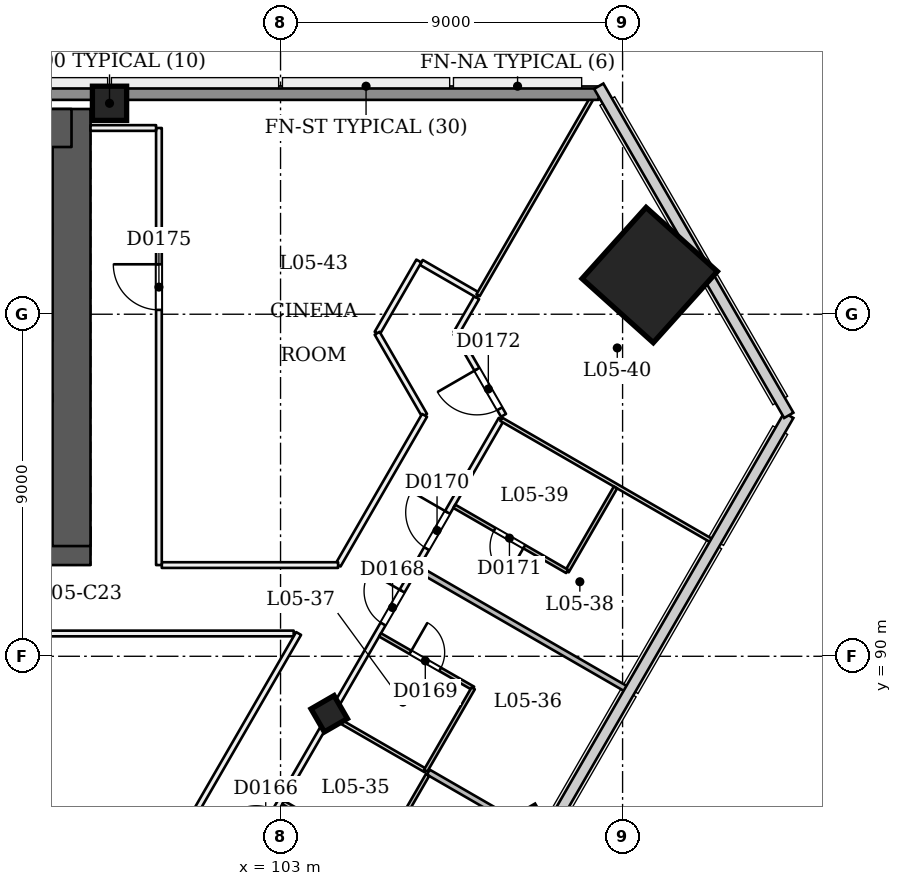
"""IFC4 building model, lengths in metres.
Left out: names, types, materials, properties, quantities, classifications, styles, units other than length and angle.
Written with IfcOpenShell. Run it as: python <this file> out.ifc"""

import sys

from ifc_helpers import new_model, si_unit, direction, frame, frame_2d, origin, origin_2d, place, context, subcontext, project, spatial, rectangle, extrude, element, fill, save


model = new_model("IFC4")
c1 = context("Model", 3, precision=1e-05, world=origin(), true_north=direction((0.0, 1.0)))
c2 = subcontext(c1, "Body", "Model", "MODEL_VIEW")
j1 = project(units=[si_unit("LENGTHUNIT", "METRE"), si_unit("PLANEANGLEUNIT", "RADIAN")], contexts=[c1])
p1 = place(None, origin())
s1 = spatial("IfcSite", under=j1, at=p1, CompositionType="ELEMENT")
p2 = place(p1, origin())
s2 = spatial("IfcBuilding", under=s1, at=p2, CompositionType="ELEMENT")
p3 = place(p2, frame((0.0, 0.0, 27.0)))
s3 = spatial("IfcBuildingStorey", under=s2, at=p3, CompositionType="ELEMENT", Elevation=27.0)
p4 = place(p3, frame((72.5, 92.9, 0.0), z_axis=(0.0, 0.0, 1.0), x_axis=(1.0, 0.0, 0.0)))
e1 = element("IfcWall", 1, at=p4, inside=s3, PredefinedType="SHEAR", context=c2, shape_type="SweptSolid", body=[
    extrude(rectangle(XDim=25.5, YDim=1.0, at=frame_2d((12.75, 0.0))), origin(), (0.0, 0.0, 1.0), 3.6),
])
p5 = place(p4, frame((1.3, 0.0, 0.0)))
e2 = element("IfcOpeningElement", 2, at=p5, cuts=e1, PredefinedType="OPENING", context=c2, shape_type="SweptSolid", body=[
    extrude(rectangle(XDim=1.2, YDim=2.1, at=frame_2d((0.6, 1.05))), frame((0.0, 0.51, 0.0), z_axis=(0.0, -1.0, 0.0), x_axis=(1.0, 0.0, 0.0)), (0.0, 0.0, 1.0), 1.021),
])
p6 = place(p4, frame((3.5, 0.0, 0.0)))
e3 = element("IfcOpeningElement", 3, at=p6, cuts=e1, PredefinedType="OPENING", context=c2, shape_type="SweptSolid", body=[
    extrude(rectangle(XDim=1.2, YDim=2.1, at=frame_2d((0.6, 1.05))), frame((0.0, 0.51, 0.0), z_axis=(0.0, -1.0, 0.0), x_axis=(1.0, 0.0, 0.0)), (0.0, 0.0, 1.0), 1.021),
])
p7 = place(p4, frame((13.5, 0.0, 0.0)))
e4 = element("IfcOpeningElement", 4, at=p7, cuts=e1, PredefinedType="OPENING", context=c2, shape_type="SweptSolid", body=[
    extrude(rectangle(XDim=1.2, YDim=2.1, at=frame_2d((0.6, 1.05))), frame((0.0, 0.51, 0.0), z_axis=(0.0, -1.0, 0.0), x_axis=(1.0, 0.0, 0.0)), (0.0, 0.0, 1.0), 1.021),
])
p8 = place(p4, frame((15.562, 0.0, 0.0)))
e5 = element("IfcOpeningElement", 5, at=p8, cuts=e1, PredefinedType="OPENING", context=c2, shape_type="SweptSolid", body=[
    extrude(rectangle(XDim=1.0, YDim=2.1, at=frame_2d((0.5, 1.05))), frame((0.0, 0.51, 0.0), z_axis=(0.0, -1.0, 0.0), x_axis=(1.0, 0.0, 0.0)), (0.0, 0.0, 1.0), 1.021),
])
p9 = place(p4, frame((17.8, 0.0, 0.0)))
e6 = element("IfcOpeningElement", 6, at=p9, cuts=e1, PredefinedType="OPENING", context=c2, shape_type="SweptSolid", body=[
    extrude(rectangle(XDim=1.0, YDim=2.1, at=frame_2d((0.5, 1.05))), frame((0.0, 0.51, 0.0), z_axis=(0.0, -1.0, 0.0), x_axis=(1.0, 0.0, 0.0)), (0.0, 0.0, 1.0), 1.021),
])
p10 = place(p4, frame((20.35, 0.0, 0.0)))
e7 = element("IfcOpeningElement", 7, at=p10, cuts=e1, PredefinedType="OPENING", context=c2, shape_type="SweptSolid", body=[
    extrude(rectangle(XDim=1.0, YDim=2.1, at=frame_2d((0.5, 1.05))), frame((0.0, 0.51, 0.0), z_axis=(0.0, -1.0, 0.0), x_axis=(1.0, 0.0, 0.0)), (0.0, 0.0, 1.0), 1.021),
])
p11 = place(p4, frame((22.837, 0.0, 0.0)))
e8 = element("IfcOpeningElement", 8, at=p11, cuts=e1, PredefinedType="OPENING", context=c2, shape_type="SweptSolid", body=[
    extrude(rectangle(XDim=1.0, YDim=2.1, at=frame_2d((0.5, 1.05))), frame((0.0, 0.51, 0.0), z_axis=(0.0, -1.0, 0.0), x_axis=(1.0, 0.0, 0.0)), (0.0, 0.0, 1.0), 1.021),
])
p12 = place(p3, frame((97.5, 92.9, 0.0), z_axis=(0.0, 0.0, 1.0), x_axis=(0.0, 1.0, 0.0)))
e9 = element("IfcWall", 9, at=p12, inside=s3, PredefinedType="SHEAR", context=c2, shape_type="SweptSolid", body=[
    extrude(rectangle(XDim=11.5, YDim=1.0, at=frame_2d((5.75, 0.0))), origin(), (0.0, 0.0, 1.0), 3.6),
])
p13 = place(p3, frame((97.5, 103.9, 0.0), z_axis=(0.0, 0.0, 1.0), x_axis=(-1.0, 0.0, 0.0)))
e10 = element("IfcWall", 10, at=p13, inside=s3, PredefinedType="SHEAR", context=c2, shape_type="SweptSolid", body=[
    extrude(rectangle(XDim=25.5, YDim=1.0, at=frame_2d((12.75, 0.0))), origin(), (0.0, 0.0, 1.0), 3.6),
])
p14 = place(p3, frame((104.308, 88.44, -0.021), z_axis=(-0.02222134892, 0.038480872521, 0.999012229206), x_axis=(-0.500169939593, -0.865642180581, 0.022218162104)))
e11 = element("IfcColumn", 11, at=p14, inside=s3, PredefinedType="COLUMN", context=c2, shape_type="SweptSolid", body=[
    extrude(rectangle(XDim=0.7, YDim=0.7, at=origin_2d()), origin(), (0.0, 0.0, 1.0), 3.604),
])
p15 = place(p3, frame((112.747, 100.02, 0.0), z_axis=(-0.028401796786, 0.009286506348, 0.999553449666), x_axis=(0.498883843993, -0.866383845889, 0.022224801134)))
e12 = element("IfcColumn", 12, at=p15, inside=s3, PredefinedType="COLUMN", context=c2, shape_type="SweptSolid", body=[
    extrude(rectangle(XDim=2.52, YDim=2.52, at=origin_2d()), origin(), (0.0, 0.0, 1.0), 3.602),
])
p16 = place(p3, frame((98.5, 104.55, 0.0), z_axis=(0.0, 0.0, 1.0), x_axis=(1.0, 0.0, 0.0)))
e13 = element("IfcColumn", 13, at=p16, inside=s3, PredefinedType="COLUMN", context=c2, shape_type="SweptSolid", body=[
    extrude(rectangle(XDim=0.9, YDim=0.9, at=origin_2d()), origin(), (0.0, 0.0, 1.0), 3.6),
])
p17 = place(p3, frame((109.547, 85.415, -0.027), z_axis=(-0.022153634206, 0.038480930364, 0.999013730882), x_axis=(-0.50131289949, -0.864981202213, 0.022201275242)))
e14 = element("IfcColumn", 14, at=p17, inside=s3, PredefinedType="COLUMN", context=c2, shape_type="SweptSolid", body=[
    extrude(rectangle(XDim=0.9, YDim=0.9, at=origin_2d()), origin(), (0.0, 0.0, 1.0), 3.604),
])
p18 = place(p3, frame((86.307, 57.264, 0.0), z_axis=(0.0, 0.0, 1.0), x_axis=(0.500000579958, 0.866025068945, 0.0)))
e15 = element("IfcWall", 15, at=p18, inside=s3, PredefinedType="PARTITIONING", context=c2, shape_type="SweptSolid", body=[
    extrude(rectangle(XDim=40.5, YDim=0.15, at=frame_2d((20.25, 0.0))), origin(), (0.0, 0.0, 1.0), 2.7),
])
p19 = place(p18, frame((0.72, 0.0, 0.0)))
e16 = element("IfcOpeningElement", 16, at=p19, cuts=e15, PredefinedType="OPENING", context=c2, shape_type="SweptSolid", body=[
    extrude(rectangle(XDim=1.0, YDim=2.1, at=frame_2d((0.5, 1.05))), frame((0.0, 0.085, 0.0), z_axis=(0.0, -1.0, 0.0), x_axis=(1.0, 0.0, 0.0)), (0.0, 0.0, 1.0), 0.171),
])
p20 = place(p18, frame((5.22, 0.0, 0.0)))
e17 = element("IfcOpeningElement", 17, at=p20, cuts=e15, PredefinedType="OPENING", context=c2, shape_type="SweptSolid", body=[
    extrude(rectangle(XDim=1.0, YDim=2.1, at=frame_2d((0.5, 1.05))), frame((0.0, 0.085, 0.0), z_axis=(0.0, -1.0, 0.0), x_axis=(1.0, 0.0, 0.0)), (0.0, 0.0, 1.0), 0.171),
])
p21 = place(p18, frame((11.78, 0.0, 0.0)))
e18 = element("IfcOpeningElement", 18, at=p21, cuts=e15, PredefinedType="OPENING", context=c2, shape_type="SweptSolid", body=[
    extrude(rectangle(XDim=1.0, YDim=2.1, at=frame_2d((0.5, 1.05))), frame((0.0, 0.085, 0.0), z_axis=(0.0, -1.0, 0.0), x_axis=(1.0, 0.0, 0.0)), (0.0, 0.0, 1.0), 0.171),
])
p22 = place(p18, frame((14.22, 0.0, 0.0)))
e19 = element("IfcOpeningElement", 19, at=p22, cuts=e15, PredefinedType="OPENING", context=c2, shape_type="SweptSolid", body=[
    extrude(rectangle(XDim=1.0, YDim=2.1, at=frame_2d((0.5, 1.05))), frame((0.0, 0.085, 0.0), z_axis=(0.0, -1.0, 0.0), x_axis=(1.0, 0.0, 0.0)), (0.0, 0.0, 1.0), 0.171),
])
p23 = place(p18, frame((19.75, 0.0, 0.0)))
e20 = element("IfcOpeningElement", 20, at=p23, cuts=e15, PredefinedType="OPENING", context=c2, shape_type="SweptSolid", body=[
    extrude(rectangle(XDim=1.0, YDim=2.1, at=frame_2d((0.5, 1.05))), frame((0.0, 0.085, 0.0), z_axis=(0.0, -1.0, 0.0), x_axis=(1.0, 0.0, 0.0)), (0.0, 0.0, 1.0), 0.171),
])
p24 = place(p18, frame((23.22, 0.0, 0.0)))
e21 = element("IfcOpeningElement", 21, at=p24, cuts=e15, PredefinedType="OPENING", context=c2, shape_type="SweptSolid", body=[
    extrude(rectangle(XDim=1.0, YDim=2.1, at=frame_2d((0.5, 1.05))), frame((0.0, 0.085, 0.0), z_axis=(0.0, -1.0, 0.0), x_axis=(1.0, 0.0, 0.0)), (0.0, 0.0, 1.0), 0.171),
])
p25 = place(p18, frame((29.895, 0.0, 0.0)))
e22 = element("IfcOpeningElement", 22, at=p25, cuts=e15, PredefinedType="OPENING", context=c2, shape_type="SweptSolid", body=[
    extrude(rectangle(XDim=1.0, YDim=2.1, at=frame_2d((0.5, 1.05))), frame((0.0, 0.085, 0.0), z_axis=(0.0, -1.0, 0.0), x_axis=(1.0, 0.0, 0.0)), (0.0, 0.0, 1.0), 0.171),
])
p26 = place(p18, frame((32.105, 0.0, 0.0)))
e23 = element("IfcOpeningElement", 23, at=p26, cuts=e15, PredefinedType="OPENING", context=c2, shape_type="SweptSolid", body=[
    extrude(rectangle(XDim=1.0, YDim=2.1, at=frame_2d((0.5, 1.05))), frame((0.0, 0.085, 0.0), z_axis=(0.0, -1.0, 0.0), x_axis=(1.0, 0.0, 0.0)), (0.0, 0.0, 1.0), 0.171),
])
p27 = place(p18, frame((38.78, 0.0, 0.0)))
e24 = element("IfcOpeningElement", 24, at=p27, cuts=e15, PredefinedType="OPENING", context=c2, shape_type="SweptSolid", body=[
    extrude(rectangle(XDim=1.0, YDim=2.1, at=frame_2d((0.5, 1.05))), frame((0.0, 0.085, 0.0), z_axis=(0.0, -1.0, 0.0), x_axis=(1.0, 0.0, 0.0)), (0.0, 0.0, 1.0), 0.171),
])
p28 = place(p3, frame((106.593, 92.4, 0.0), z_axis=(0.0, 0.0, 1.0), x_axis=(0.499968989506, 0.866043306961, 0.0)))
e25 = element("IfcWall", 25, at=p28, inside=s3, PredefinedType="PARTITIONING", context=c2, shape_type="SweptSolid", body=[
    extrude(rectangle(XDim=4.429, YDim=0.15, at=frame_2d((2.214, 0.0))), origin(), (0.0, 0.0, 1.0), 3.1),
])
p29 = place(p28, frame((0.5, 0.0, 0.0)))
e26 = element("IfcOpeningElement", 26, at=p29, cuts=e25, PredefinedType="OPENING", context=c2, shape_type="SweptSolid", body=[
    extrude(rectangle(XDim=1.1, YDim=2.1, at=frame_2d((0.55, 1.05))), frame((0.0, 0.085, 0.0), z_axis=(0.0, -1.0, 0.0), x_axis=(1.0, 0.0, 0.0)), (0.0, 0.0, 1.0), 0.171),
])
p30 = place(p3, frame((108.867, 96.34, 0.0), z_axis=(0.0, 0.0, 1.0), x_axis=(-0.499970989427, 0.866042152399, 0.0)))
e27 = element("IfcWall", 27, at=p30, inside=s3, PredefinedType="PARTITIONING", context=c2, shape_type="SweptSolid", body=[
    extrude(rectangle(XDim=2.494, YDim=0.15, at=frame_2d((1.247, 0.0))), origin(), (0.0, 0.0, 1.0), 3.1),
])
p31 = place(p30, frame((0.2, 0.0, 0.0)))
e28 = element("IfcOpeningElement", 28, at=p31, cuts=e27, PredefinedType="OPENING", context=c2, shape_type="SweptSolid", body=[
    extrude(rectangle(XDim=1.2, YDim=2.1, at=frame_2d((0.6, 1.05))), frame((0.0, 0.085, 0.0), z_axis=(0.0, -1.0, 0.0), x_axis=(1.0, 0.0, 0.0)), (0.0, 0.0, 1.0), 0.171),
])
p32 = place(p3, frame((107.62, 98.5, 0.0), z_axis=(0.0, 0.0, 1.0), x_axis=(0.499957341738, 0.866050031143, 0.0)))
e29 = element("IfcWall", 29, at=p32, inside=s3, PredefinedType="PARTITIONING", context=c2, shape_type="SweptSolid", body=[
    extrude(rectangle(XDim=1.08, YDim=0.15, at=frame_2d((0.54, 0.0))), origin(), (0.0, 0.0, 1.0), 3.1),
])
p33 = place(p3, frame((88.0, 90.599, 0.0), z_axis=(0.0, 0.0, 1.0), x_axis=(0.999999997975, 6.3639545e-05, 0.0)))
e30 = element("IfcWall", 30, at=p33, inside=s3, PredefinedType="PARTITIONING", context=c2, shape_type="SweptSolid", body=[
    extrude(rectangle(XDim=15.345, YDim=0.15, at=frame_2d((7.673, 0.0))), origin(), (0.0, 0.0, 1.0), 3.1),
])
p34 = place(p33, frame((0.2, 0.0, 0.0)))
e31 = element("IfcOpeningElement", 31, at=p34, cuts=e30, PredefinedType="OPENING", context=c2, shape_type="SweptSolid", body=[
    extrude(rectangle(XDim=1.2, YDim=2.1, at=frame_2d((0.6, 1.05))), frame((0.0, 0.085, 0.0), z_axis=(0.0, -1.0, 0.0), x_axis=(1.0, 0.0, 0.0)), (0.0, 0.0, 1.0), 0.171),
])
p35 = place(p3, frame((103.475, 90.6, 0.0), z_axis=(0.0, 0.0, 1.0), x_axis=(-0.500000687442, -0.866025006889, 0.0)))
e32 = element("IfcWall", 32, at=p35, inside=s3, PredefinedType="PARTITIONING", context=c2, shape_type="SweptSolid", body=[
    extrude(rectangle(XDim=36.535, YDim=0.15, at=frame_2d((18.267, 0.0))), origin(), (0.0, 0.0, 1.0), 3.1),
])
p36 = place(p35, frame((8.507, 0.0, 0.0)))
e33 = element("IfcOpeningElement", 33, at=p36, cuts=e32, PredefinedType="OPENING", context=c2, shape_type="SweptSolid", body=[
    extrude(rectangle(XDim=1.2, YDim=2.1, at=frame_2d((0.6, 1.05))), frame((0.0, 0.085, 0.0), z_axis=(0.0, -1.0, 0.0), x_axis=(1.0, 0.0, 0.0)), (0.0, 0.0, 1.0), 0.171),
])
p37 = place(p3, frame((108.198, 99.5, 0.0), z_axis=(0.0, 0.0, 1.0), x_axis=(-0.866013532718, 0.500020560727, 0.0)))
e34 = element("IfcWall", 34, at=p37, inside=s3, PredefinedType="PARTITIONING", context=c2, shape_type="SweptSolid", body=[
    extrude(rectangle(XDim=1.725, YDim=0.15, at=frame_2d((0.863, 0.0))), origin(), (0.0, 0.0, 1.0), 3.1),
])
p38 = place(p3, frame((106.639, 100.4, 0.0), z_axis=(0.0, 0.0, 1.0), x_axis=(-0.500005024956, -0.866022502605, 0.0)))
e35 = element("IfcWall", 35, at=p38, inside=s3, PredefinedType="PARTITIONING", context=c2, shape_type="SweptSolid", body=[
    extrude(rectangle(XDim=2.194, YDim=0.15, at=frame_2d((1.097, 0.0))), origin(), (0.0, 0.0, 1.0), 3.1),
])
p39 = place(p3, frame((105.542, 98.5, 0.0), z_axis=(0.0, 0.0, 1.0), x_axis=(0.50004439687, -0.865999769722, 0.0)))
e36 = element("IfcWall", 36, at=p39, inside=s3, PredefinedType="PARTITIONING", context=c2, shape_type="SweptSolid", body=[
    extrude(rectangle(XDim=2.494, YDim=0.15, at=frame_2d((1.247, 0.0))), origin(), (0.0, 0.0, 1.0), 3.1),
])
p40 = place(p3, frame((106.789, 96.34, 0.0), z_axis=(0.0, 0.0, 1.0), x_axis=(-0.499988785058, -0.866031878637, 0.0)))
e37 = element("IfcWall", 37, at=p40, inside=s3, PredefinedType="PARTITIONING", context=c2, shape_type="SweptSolid", body=[
    extrude(rectangle(XDim=4.549, YDim=0.15, at=frame_2d((2.275, 0.0))), origin(), (0.0, 0.0, 1.0), 3.1),
])
p41 = place(p3, frame((104.514, 92.4, 0.0), z_axis=(0.0, 0.0, 1.0), x_axis=(-1.0, 0.0, 0.0)))
e38 = element("IfcWall", 38, at=p41, inside=s3, PredefinedType="PARTITIONING", context=c2, shape_type="SweptSolid", body=[
    extrude(rectangle(XDim=4.639, YDim=0.15, at=frame_2d((2.32, 0.0))), origin(), (0.0, 0.0, 1.0), 3.1),
])
p42 = place(p3, frame((99.8, 92.4, 0.0), z_axis=(0.0, 0.0, 1.0), x_axis=(0.0, 1.0, 0.0)))
e39 = element("IfcWall", 39, at=p42, inside=s3, PredefinedType="PARTITIONING", context=c2, shape_type="SweptSolid", body=[
    extrude(rectangle(XDim=11.5, YDim=0.15, at=frame_2d((5.75, 0.0))), origin(), (0.0, 0.0, 1.0), 2.6),
])
p43 = place(p42, frame((6.714, 0.0, 0.0)))
e40 = element("IfcOpeningElement", 40, at=p43, cuts=e39, PredefinedType="OPENING", context=c2, shape_type="SweptSolid", body=[
    extrude(rectangle(XDim=1.2, YDim=2.1, at=frame_2d((0.6, 1.05))), frame((0.0, 0.085, 0.0), z_axis=(0.0, -1.0, 0.0), x_axis=(1.0, 0.0, 0.0)), (0.0, 0.0, 1.0), 0.171),
])
p44 = place(p3, frame((99.725, 103.9, 0.0), z_axis=(0.0, 0.0, 1.0), x_axis=(-1.0, 0.0, 0.0)))
e41 = element("IfcWall", 41, at=p44, inside=s3, PredefinedType="PARTITIONING", context=c2, shape_type="SweptSolid", body=[
    extrude(rectangle(XDim=1.725, YDim=0.15, at=frame_2d((0.863, 0.0))), origin(), (0.0, 0.0, 1.0), 2.6),
])
p45 = place(p3, frame((106.868, 86.876, 0.0), z_axis=(0.0, 0.0, 1.0), x_axis=(-0.499976333282, -0.866039067339, 0.0)))
e42 = element("IfcWall", 42, at=p45, inside=s3, PredefinedType="PARTITIONING", context=c2, shape_type="SweptSolid", body=[
    extrude(rectangle(XDim=2.525, YDim=0.1, at=frame_2d((1.262, 0.0))), origin(), (0.0, 0.0, 1.0), 2.7),
])
p46 = place(p3, frame((105.605, 84.69, 0.0), z_axis=(0.0, 0.0, 1.0), x_axis=(-0.866046596414, 0.499963291492, 0.0)))
e43 = element("IfcWall", 43, at=p46, inside=s3, PredefinedType="PARTITIONING", context=c2, shape_type="SweptSolid", body=[
    extrude(rectangle(XDim=2.925, YDim=0.1, at=frame_2d((1.462, 0.0))), origin(), (0.0, 0.0, 1.0), 3.1),
])
p47 = place(p46, frame((1.05, 0.0, 0.0)))
e44 = element("IfcOpeningElement", 44, at=p47, cuts=e43, PredefinedType="OPENING", context=c2, shape_type="SweptSolid", body=[
    extrude(rectangle(XDim=0.9, YDim=2.1, at=frame_2d((0.45, 1.05))), frame((0.0, 0.061, 0.0), z_axis=(0.0, -1.0, 0.0), x_axis=(1.0, 0.0, 0.0)), (0.0, 0.0, 1.0), 0.121),
])
p48 = place(p3, frame((109.85, 85.241, 0.0), z_axis=(0.0, 0.0, 1.0), x_axis=(-0.866020337685, 0.500008774639, 0.0)))
e45 = element("IfcWall", 45, at=p48, inside=s3, PredefinedType="PARTITIONING", context=c2, shape_type="SweptSolid", body=[
    extrude(rectangle(XDim=3.42, YDim=0.15, at=frame_2d((1.71, 0.0))), origin(), (0.0, 0.0, 1.0), 2.6),
])
p49 = place(p3, frame((106.819, 86.991, 0.0), z_axis=(0.0, 0.0, 1.0), x_axis=(-0.866048868473, 0.499959355765, 0.0)))
e46 = element("IfcWall", 46, at=p49, inside=s3, PredefinedType="PARTITIONING", context=c2, shape_type="SweptSolid", body=[
    extrude(rectangle(XDim=2.825, YDim=0.1, at=frame_2d((1.413, 0.0))), origin(), (0.0, 0.0, 1.0), 2.7),
])
p50 = place(p3, frame((105.619, 90.562, 0.0), z_axis=(0.0, 0.0, 1.0), x_axis=(0.867321505614, -0.497748335908, 0.0)))
e47 = element("IfcWall", 47, at=p50, inside=s3, PredefinedType="PARTITIONING", context=c2, shape_type="SweptSolid", body=[
    extrude(rectangle(XDim=2.825, YDim=0.1, at=frame_2d((1.412, 0.0))), origin(), (0.0, 0.0, 1.0), 3.1),
])
p51 = place(p50, frame((0.922, 0.0, 0.0)))
e48 = element("IfcOpeningElement", 48, at=p51, cuts=e47, PredefinedType="OPENING", context=c2, shape_type="SweptSolid", body=[
    extrude(rectangle(XDim=0.9, YDim=2.1, at=frame_2d((0.45, 1.05))), frame((0.0, 0.061, 0.0), z_axis=(0.0, -1.0, 0.0), x_axis=(1.0, 0.0, 0.0)), (0.0, 0.0, 1.0), 0.121),
])
p52 = place(p3, frame((108.069, 89.156, 0.0), z_axis=(0.0, 0.0, 1.0), x_axis=(-0.500004234368, -0.866022959057, 0.0)))
e49 = element("IfcWall", 49, at=p52, inside=s3, PredefinedType="PARTITIONING", context=c2, shape_type="SweptSolid", body=[
    extrude(rectangle(XDim=2.5, YDim=0.1, at=frame_2d((1.25, 0.0))), origin(), (0.0, 0.0, 1.0), 2.7),
])
p53 = place(p3, frame((112.117, 89.128, 0.0), z_axis=(0.0, 0.0, 1.0), x_axis=(-0.866025401434, 0.500000004071, 0.0)))
e50 = element("IfcWall", 50, at=p53, inside=s3, PredefinedType="PARTITIONING", context=c2, shape_type="SweptSolid", body=[
    extrude(rectangle(XDim=6.345, YDim=0.15, at=frame_2d((3.173, 0.0))), origin(), (0.0, 0.0, 1.0), 2.6),
])
p54 = place(p3, frame((111.813, 94.442, 0.0), z_axis=(0.0, 0.0, 1.0), x_axis=(-0.499948979701, -0.866054858364, 0.0)))
e51 = element("IfcWall", 51, at=p54, inside=s3, PredefinedType="PARTITIONING", context=c2, shape_type="SweptSolid", body=[
    extrude(rectangle(XDim=2.55, YDim=0.1, at=frame_2d((1.275, 0.0))), origin(), (0.0, 0.0, 1.0), 2.6),
])
p55 = place(p3, frame((110.539, 92.234, 0.0), z_axis=(0.0, 0.0, 1.0), x_axis=(-0.866050272892, 0.499956922968, 0.0)))
e52 = element("IfcWall", 52, at=p55, inside=s3, PredefinedType="PARTITIONING", context=c2, shape_type="SweptSolid", body=[
    extrude(rectangle(XDim=3.425, YDim=0.1, at=frame_2d((1.712, 0.0))), origin(), (0.0, 0.0, 1.0), 3.1),
])
p56 = place(p55, frame((1.3, 0.0, 0.0)))
e53 = element("IfcOpeningElement", 53, at=p56, cuts=e52, PredefinedType="OPENING", context=c2, shape_type="SweptSolid", body=[
    extrude(rectangle(XDim=0.9, YDim=2.1, at=frame_2d((0.45, 1.05))), frame((0.0, 0.061, 0.0), z_axis=(0.0, -1.0, 0.0), x_axis=(1.0, 0.0, 0.0)), (0.0, 0.0, 1.0), 0.121),
])
p57 = place(p3, frame((114.367, 93.025, 0.0), z_axis=(0.0, 0.0, 1.0), x_axis=(-0.866018406147, 0.500012120068, 0.0)))
e54 = element("IfcWall", 54, at=p57, inside=s3, PredefinedType="PARTITIONING", context=c2, shape_type="SweptSolid", body=[
    extrude(rectangle(XDim=6.42, YDim=0.1, at=frame_2d((3.21, 0.0))), origin(), (0.0, 0.0, 1.0), 2.6),
])
p58 = place(p3, frame((111.315, 104.9, 0.0), z_axis=(0.0, 0.0, 1.0), x_axis=(-0.500004896655, -0.866022576681, 0.0)))
e55 = element("IfcWall", 55, at=p58, inside=s3, PredefinedType="PARTITIONING", context=c2, shape_type="SweptSolid", body=[
    extrude(rectangle(XDim=6.235, YDim=0.1, at=frame_2d((3.118, 0.0))), origin(), (0.0, 0.0, 1.0), 2.6),
])
p59 = place(p3, frame((58.627, 104.79, 0.0), z_axis=(0.0, 0.0, 1.0), x_axis=(1.0, 0.0, 0.0)))
e56 = element("IfcWall", 56, at=p59, inside=s3, PredefinedType="SOLIDWALL", context=c2, shape_type="SweptSolid", body=[
    extrude(rectangle(XDim=52.746, YDim=0.3, at=frame_2d((26.373, 0.0))), origin(), (0.0, 0.0, 1.0), 2.6),
])
p60 = place(p27, origin())
e57 = element("IfcDoor", 57, at=p60, inside=s3, OperationType="SINGLE_SWING_RIGHT", PredefinedType="NOTDEFINED", context=c2, shape_type="SweptSolid", body=[
    extrude(rectangle(XDim=1.0, YDim=2.1, at=frame_2d((0.5, 1.05))), frame((0.0, 0.025, 0.0), z_axis=(0.0, -1.0, 0.0), x_axis=(1.0, 0.0, 0.0)), (0.0, 0.0, 1.0), 0.05),
])
fill(e24, e57)
p61 = place(p51, origin())
e58 = element("IfcDoor", 58, at=p61, inside=s3, OperationType="SINGLE_SWING_LEFT", PredefinedType="NOTDEFINED", context=c2, shape_type="SweptSolid", body=[
    extrude(rectangle(XDim=0.9, YDim=2.1, at=frame_2d((0.45, 1.05))), frame((0.0, 0.025, 0.0), z_axis=(0.0, -1.0, 0.0), x_axis=(1.0, 0.0, 0.0)), (0.0, 0.0, 1.0), 0.05),
])
fill(e48, e58)
p62 = place(p29, origin())
e59 = element("IfcDoor", 59, at=p62, inside=s3, OperationType="SINGLE_SWING_RIGHT", PredefinedType="NOTDEFINED", context=c2, shape_type="SweptSolid", body=[
    extrude(rectangle(XDim=1.1, YDim=2.1, at=frame_2d((0.55, 1.05))), frame((0.0, 0.025, 0.0), z_axis=(0.0, -1.0, 0.0), x_axis=(1.0, 0.0, 0.0)), (0.0, 0.0, 1.0), 0.05),
])
fill(e26, e59)
p63 = place(p56, origin())
e60 = element("IfcDoor", 60, at=p63, inside=s3, OperationType="SINGLE_SWING_LEFT", PredefinedType="NOTDEFINED", context=c2, shape_type="SweptSolid", body=[
    extrude(rectangle(XDim=0.9, YDim=2.1, at=frame_2d((0.45, 1.05))), frame((0.0, 0.025, 0.0), z_axis=(0.0, -1.0, 0.0), x_axis=(1.0, 0.0, 0.0)), (0.0, 0.0, 1.0), 0.05),
])
fill(e53, e60)
p64 = place(p31, origin())
e61 = element("IfcDoor", 61, at=p64, inside=s3, OperationType="SINGLE_SWING_RIGHT", PredefinedType="NOTDEFINED", context=c2, shape_type="SweptSolid", body=[
    extrude(rectangle(XDim=1.2, YDim=2.1, at=frame_2d((0.6, 1.05))), frame((0.0, 0.025, 0.0), z_axis=(0.0, -1.0, 0.0), x_axis=(1.0, 0.0, 0.0)), (0.0, 0.0, 1.0), 0.05),
])
fill(e28, e61)
p65 = place(p43, origin())
e62 = element("IfcDoor", 62, at=p65, inside=s3, OperationType="SINGLE_SWING_RIGHT", PredefinedType="NOTDEFINED", context=c2, shape_type="SweptSolid", body=[
    extrude(rectangle(XDim=1.2, YDim=2.1, at=frame_2d((0.6, 1.05))), frame((0.0, 0.025, 0.0), z_axis=(0.0, -1.0, 0.0), x_axis=(1.0, 0.0, 0.0)), (0.0, 0.0, 1.0), 0.05),
])
fill(e40, e62)
save(model, sys.argv[1])
